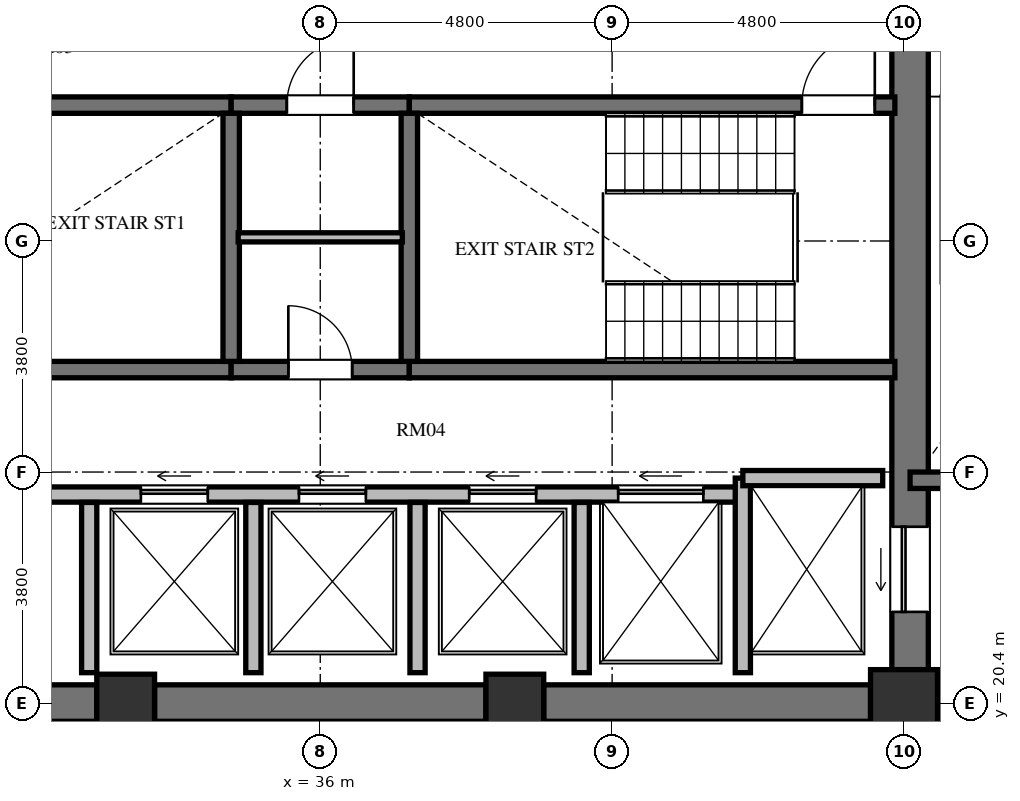
"""IFC4 building model, lengths in metres.
Left out: names, types, materials, properties, quantities, classifications, styles, units other than length and angle.
Written with IfcOpenShell. Run it as: python <this file> out.ifc"""

import sys

from ifc_helpers import new_model, si_unit, direction, frame, frame_2d, origin, origin_2d, place, context, subcontext, project, spatial, rectangle, extrude, element, fill, save


model = new_model("IFC4")
c1 = context("Model", 3, precision=1e-05, world=origin(), true_north=direction((0.0, 1.0)))
c2 = subcontext(c1, "Body", "Model", "MODEL_VIEW")
j1 = project(units=[si_unit("LENGTHUNIT", "METRE"), si_unit("PLANEANGLEUNIT", "RADIAN")], contexts=[c1])
p1 = place(None, origin())
s1 = spatial("IfcSite", under=j1, at=p1, CompositionType="ELEMENT")
p2 = place(p1, origin())
s2 = spatial("IfcBuilding", under=s1, at=p2, CompositionType="ELEMENT")
p3 = place(p2, frame((0.0, 0.0, 174.768)))
s3 = spatial("IfcBuildingStorey", under=s2, at=p3, CompositionType="ELEMENT", Elevation=174.768)
for number, where, z_axis, x_axis in (
    (1, (32.8, 20.4, 0.0), (0.0, 0.0, 1.0), (1.0, 0.0, 0.0)),
    (2, (39.2, 20.4, 0.0), (0.0, 0.0, 1.0), (1.0, 0.0, 0.0)),
):
    element("IfcColumn", number, at=place(p3, frame(where, z_axis=z_axis, x_axis=x_axis)), inside=s3, PredefinedType="COLUMN", context=c2, shape_type="SweptSolid", body=[
        extrude(rectangle(XDim=0.95, YDim=0.95, at=origin_2d()), origin(), (0.0, 0.0, 1.0), 3.648),
    ])
p4 = place(p3, frame((45.6, 20.4, 0.0), z_axis=(0.0, 0.0, 1.0), x_axis=(1.0, 0.0, 0.0)))
e3 = element("IfcColumn", 3, at=p4, inside=s3, PredefinedType="COLUMN", context=c2, shape_type="SweptSolid", body=[
    extrude(rectangle(XDim=1.1, YDim=1.1, at=origin_2d()), origin(), (0.0, 0.0, 1.0), 3.648),
])
p5 = place(p3, frame((45.7, 20.95, 0.0), z_axis=(0.0, 0.0, 1.0), x_axis=(0.0, 1.0, 0.0)))
e4 = element("IfcWall", 4, at=p5, inside=s3, PredefinedType="SHEAR", context=c2, shape_type="SweptSolid", body=[
    extrude(rectangle(XDim=14.1, YDim=0.6, at=frame_2d((7.05, 0.0))), origin(), (0.0, 0.0, 1.0), 3.648),
])
p6 = place(p5, frame((11.75, 0.0, 0.0)))
e5 = element("IfcOpeningElement", 5, at=p6, cuts=e4, PredefinedType="OPENING", context=c2, shape_type="SweptSolid", body=[
    extrude(rectangle(XDim=1.4, YDim=2.3, at=frame_2d((0.7, 1.15))), frame((0.0, 0.31, 0.0), z_axis=(0.0, -1.0, 0.0), x_axis=(1.0, 0.0, 0.0)), (0.0, 0.0, 1.0), 0.62),
])
p7 = place(p5, frame((0.95, 0.0, 0.0)))
e6 = element("IfcOpeningElement", 6, at=p7, cuts=e4, PredefinedType="OPENING", context=c2, shape_type="SweptSolid", body=[
    extrude(rectangle(XDim=1.4, YDim=2.3, at=frame_2d((0.7, 1.15))), frame((0.0, 0.31, 0.0), z_axis=(0.0, -1.0, 0.0), x_axis=(1.0, 0.0, 0.0)), (0.0, 0.0, 1.0), 0.62),
])
p8 = place(p3, frame((26.95, 20.4, 0.0), z_axis=(0.0, 0.0, 1.0), x_axis=(1.0, 0.0, 0.0)))
e7 = element("IfcWall", 7, at=p8, inside=s3, PredefinedType="SHEAR", context=c2, shape_type="SweptSolid", body=[
    extrude(rectangle(XDim=5.375, YDim=0.6, at=frame_2d((2.688, 0.0))), origin(), (0.0, 0.0, 1.0), 3.648),
])
p9 = place(p3, frame((33.275, 20.4, 0.0), z_axis=(0.0, 0.0, 1.0), x_axis=(1.0, 0.0, 0.0)))
e8 = element("IfcWall", 8, at=p9, inside=s3, PredefinedType="SHEAR", context=c2, shape_type="SweptSolid", body=[
    extrude(rectangle(XDim=5.45, YDim=0.6, at=frame_2d((2.725, 0.0))), origin(), (0.0, 0.0, 1.0), 3.648),
])
p10 = place(p3, frame((39.675, 20.4, 0.0), z_axis=(0.0, 0.0, 1.0), x_axis=(1.0, 0.0, 0.0)))
e9 = element("IfcWall", 9, at=p10, inside=s3, PredefinedType="SHEAR", context=c2, shape_type="SweptSolid", body=[
    extrude(rectangle(XDim=5.375, YDim=0.6, at=frame_2d((2.688, 0.0))), origin(), (0.0, 0.0, 1.0), 3.648),
])
p11 = place(p3, frame((26.55, 30.235, 0.0), z_axis=(0.0, 0.0, 1.0), x_axis=(1.0, 0.0, 0.0)))
e10 = element("IfcWall", 10, at=p11, inside=s3, PredefinedType="SHEAR", context=c2, shape_type="SweptSolid", body=[
    extrude(rectangle(XDim=7.985, YDim=0.27, at=frame_2d((3.992, 0.0))), origin(), (0.0, 0.0, 1.0), 3.648),
])
p12 = place(p3, frame((34.535, 30.235, 0.0), z_axis=(0.0, 0.0, 1.0), x_axis=(1.0, 0.0, 0.0)))
e11 = element("IfcWall", 11, at=p12, inside=s3, PredefinedType="SHEAR", context=c2, shape_type="SweptSolid", body=[
    extrude(rectangle(XDim=2.93, YDim=0.27, at=frame_2d((1.465, 0.0))), origin(), (0.0, 0.0, 1.0), 3.648),
])
p13 = place(p12, frame((0.915, 0.0, 0.0)))
e12 = element("IfcOpeningElement", 12, at=p13, cuts=e11, PredefinedType="OPENING", context=c2, shape_type="SweptSolid", body=[
    extrude(rectangle(XDim=1.1, YDim=2.15, at=frame_2d((0.55, 1.075))), frame((0.0, 0.145, 0.0), z_axis=(0.0, -1.0, 0.0), x_axis=(1.0, 0.0, 0.0)), (0.0, 0.0, 1.0), 0.29),
])
p14 = place(p3, frame((37.465, 30.235, 0.0), z_axis=(0.0, 0.0, 1.0), x_axis=(1.0, 0.0, 0.0)))
e13 = element("IfcWall", 13, at=p14, inside=s3, PredefinedType="SHEAR", context=c2, shape_type="SweptSolid", body=[
    extrude(rectangle(XDim=7.985, YDim=0.27, at=frame_2d((3.992, 0.0))), origin(), (0.0, 0.0, 1.0), 3.648),
])
p15 = place(p14, frame((6.455, 0.0, 0.0)))
e14 = element("IfcOpeningElement", 14, at=p15, cuts=e13, PredefinedType="OPENING", context=c2, shape_type="SweptSolid", body=[
    extrude(rectangle(XDim=1.2, YDim=2.15, at=frame_2d((0.6, 1.075))), frame((0.0, 0.145, 0.0), z_axis=(0.0, -1.0, 0.0), x_axis=(1.0, 0.0, 0.0)), (0.0, 0.0, 1.0), 0.29),
])
p16 = place(p3, frame((26.55, 25.885, 0.0), z_axis=(0.0, 0.0, 1.0), x_axis=(1.0, 0.0, 0.0)))
e15 = element("IfcWall", 15, at=p16, inside=s3, PredefinedType="SHEAR", context=c2, shape_type="SweptSolid", body=[
    extrude(rectangle(XDim=7.985, YDim=0.27, at=frame_2d((3.992, 0.0))), origin(), (0.0, 0.0, 1.0), 3.648),
])
p17 = place(p3, frame((34.535, 25.885, 0.0), z_axis=(0.0, 0.0, 1.0), x_axis=(1.0, 0.0, 0.0)))
e16 = element("IfcWall", 16, at=p17, inside=s3, PredefinedType="SHEAR", context=c2, shape_type="SweptSolid", body=[
    extrude(rectangle(XDim=2.93, YDim=0.27, at=frame_2d((1.465, 0.0))), origin(), (0.0, 0.0, 1.0), 3.648),
])
p18 = place(p17, frame((0.94, 0.0, 0.0)))
e17 = element("IfcOpeningElement", 17, at=p18, cuts=e16, PredefinedType="OPENING", context=c2, shape_type="SweptSolid", body=[
    extrude(rectangle(XDim=1.05, YDim=2.15, at=frame_2d((0.525, 1.075))), frame((0.0, 0.145, 0.0), z_axis=(0.0, -1.0, 0.0), x_axis=(1.0, 0.0, 0.0)), (0.0, 0.0, 1.0), 0.29),
])
p19 = place(p3, frame((37.465, 25.885, 0.0), z_axis=(0.0, 0.0, 1.0), x_axis=(1.0, 0.0, 0.0)))
e18 = element("IfcWall", 18, at=p19, inside=s3, PredefinedType="SHEAR", context=c2, shape_type="SweptSolid", body=[
    extrude(rectangle(XDim=7.985, YDim=0.27, at=frame_2d((3.992, 0.0))), origin(), (0.0, 0.0, 1.0), 3.648),
])
for number, where, z_axis, x_axis in (
    (19, (34.535, 26.02, 0.0), (0.0, 0.0, 1.0), (0.0, 1.0, 0.0)),
    (20, (37.465, 26.02, 0.0), (0.0, 0.0, 1.0), (0.0, 1.0, 0.0)),
):
    element("IfcWall", number, at=place(p3, frame(where, z_axis=z_axis, x_axis=x_axis)), inside=s3, PredefinedType="SHEAR", context=c2, shape_type="SweptSolid", body=[
        extrude(rectangle(XDim=4.08, YDim=0.27, at=frame_2d((2.04, 0.0))), origin(), (0.0, 0.0, 1.0), 3.648),
    ])
p20 = place(p3, frame((34.65, 28.06, 0.0), z_axis=(0.0, 0.0, 1.0), x_axis=(1.0, 0.0, 0.0)))
e21 = element("IfcWall", 21, at=p20, inside=s3, PredefinedType="PARTITIONING", context=c2, shape_type="SweptSolid", body=[
    extrude(rectangle(XDim=2.7, YDim=0.15, at=frame_2d((1.35, 0.0))), origin(), (0.0, 0.0, 1.0), 3.428),
])
p21 = place(p3, frame((26.75, 23.83, 0.0), z_axis=(0.0, 0.0, 1.0), x_axis=(1.0, 0.0, 0.0)))
e22 = element("IfcWall", 22, at=p21, inside=s3, PredefinedType="SOLIDWALL", context=c2, shape_type="SweptSolid", body=[
    extrude(rectangle(XDim=16.2, YDim=0.25, at=frame_2d((8.1, 0.0))), origin(), (0.0, 0.0, 1.0), 3.428),
])
p22 = place(p21, frame((2.225, 0.0, 0.0)))
e23 = element("IfcOpeningElement", 23, at=p22, cuts=e22, PredefinedType="OPENING", context=c2, shape_type="SweptSolid", body=[
    extrude(rectangle(XDim=1.05, YDim=2.15, at=frame_2d((0.525, 1.075))), frame((0.0, 0.135, 0.0), z_axis=(0.0, -1.0, 0.0), x_axis=(1.0, 0.0, 0.0)), (0.0, 0.0, 1.0), 0.27),
])
p23 = place(p21, frame((6.3, 0.0, 0.0)))
e24 = element("IfcOpeningElement", 24, at=p23, cuts=e22, PredefinedType="OPENING", context=c2, shape_type="SweptSolid", body=[
    extrude(rectangle(XDim=1.1, YDim=2.2, at=frame_2d((0.55, 1.1))), frame((0.0, 0.135, 0.0), z_axis=(0.0, -1.0, 0.0), x_axis=(1.0, 0.0, 0.0)), (0.0, 0.0, 1.0), 0.27),
])
p24 = place(p21, frame((8.9, 0.0, 0.0)))
e25 = element("IfcOpeningElement", 25, at=p24, cuts=e22, PredefinedType="OPENING", context=c2, shape_type="SweptSolid", body=[
    extrude(rectangle(XDim=1.1, YDim=2.2, at=frame_2d((0.55, 1.1))), frame((0.0, 0.135, 0.0), z_axis=(0.0, -1.0, 0.0), x_axis=(1.0, 0.0, 0.0)), (0.0, 0.0, 1.0), 0.27),
])
p25 = place(p21, frame((11.7, 0.0, 0.0)))
e26 = element("IfcOpeningElement", 26, at=p25, cuts=e22, PredefinedType="OPENING", context=c2, shape_type="SweptSolid", body=[
    extrude(rectangle(XDim=1.1, YDim=2.2, at=frame_2d((0.55, 1.1))), frame((0.0, 0.135, 0.0), z_axis=(0.0, -1.0, 0.0), x_axis=(1.0, 0.0, 0.0)), (0.0, 0.0, 1.0), 0.27),
])
p26 = place(p21, frame((14.15, 0.0, 0.0)))
e27 = element("IfcOpeningElement", 27, at=p26, cuts=e22, PredefinedType="OPENING", context=c2, shape_type="SweptSolid", body=[
    extrude(rectangle(XDim=1.4, YDim=2.3, at=frame_2d((0.7, 1.15))), frame((0.0, 0.135, 0.0), z_axis=(0.0, -1.0, 0.0), x_axis=(1.0, 0.0, 0.0)), (0.0, 0.0, 1.0), 0.27),
])
p27 = place(p3, frame((42.95, 20.9, 0.0), z_axis=(0.0, 0.0, 1.0), x_axis=(0.0, 1.0, 0.0)))
e28 = element("IfcWall", 28, at=p27, inside=s3, PredefinedType="SOLIDWALL", context=c2, shape_type="SweptSolid", body=[
    extrude(rectangle(XDim=3.2, YDim=0.25, at=frame_2d((1.6, 0.0))), origin(), (0.0, 0.0, 1.0), 3.428),
])
p28 = place(p3, frame((42.95, 24.1, 0.0), z_axis=(0.0, 0.0, 1.0), x_axis=(1.0, 0.0, 0.0)))
e29 = element("IfcWall", 29, at=p28, inside=s3, PredefinedType="SOLIDWALL", context=c2, shape_type="SweptSolid", body=[
    extrude(rectangle(XDim=2.3, YDim=0.25, at=frame_2d((1.15, 0.0))), origin(), (0.0, 0.0, 1.0), 3.428),
])
for number, where, z_axis, x_axis in (
    (30, (32.2, 20.9, 0.0), (0.0, 0.0, 1.0), (0.0, 1.0, 0.0)),
    (31, (34.9, 20.9, 0.0), (0.0, 0.0, 1.0), (0.0, 1.0, 0.0)),
    (32, (37.6, 20.9, 0.0), (0.0, 0.0, 1.0), (0.0, 1.0, 0.0)),
    (33, (40.3, 20.9, 0.0), (0.0, 0.0, 1.0), (0.0, 1.0, 0.0)),
):
    element("IfcWall", number, at=place(p3, frame(where, z_axis=z_axis, x_axis=x_axis)), inside=s3, PredefinedType="SOLIDWALL", context=c2, shape_type="SweptSolid", body=[
        extrude(rectangle(XDim=2.8, YDim=0.25, at=frame_2d((1.4, 0.0))), origin(), (0.0, 0.0, 1.0), 3.428),
    ])
p29 = place(p3, frame((45.7, 24.065, 0.0), z_axis=(0.0, 0.0, 1.0), x_axis=(1.0, 0.0, 0.0)))
e34 = element("IfcWall", 34, at=p29, inside=s3, PredefinedType="SHEAR", context=c2, shape_type="SweptSolid", body=[
    extrude(rectangle(XDim=4.715, YDim=0.27, at=frame_2d((2.357, 0.0))), origin(), (0.0, 0.0, 1.0), 3.648),
])
p30 = place(p3, frame((45.7, 20.02, 0.0), z_axis=(0.0, 0.0, 1.0), x_axis=(1.0, 0.0, 0.0)))
e35 = element("IfcWall", 35, at=p30, inside=s3, PredefinedType="SOLIDWALL", context=c2, shape_type="SweptSolid", body=[
    extrude(rectangle(XDim=4.715, YDim=0.25, at=frame_2d((2.357, 0.0))), origin(), (0.0, 0.0, 1.0), 3.428),
])
p31 = place(p15, origin())
e36 = element("IfcDoor", 36, at=p31, inside=s3, OperationType="SINGLE_SWING_RIGHT", PredefinedType="DOOR", context=c2, shape_type="SweptSolid", body=[
    extrude(rectangle(XDim=1.2, YDim=2.15, at=frame_2d((0.6, 1.075))), frame((0.0, 0.025, 0.0), z_axis=(0.0, -1.0, 0.0), x_axis=(1.0, 0.0, 0.0)), (0.0, 0.0, 1.0), 0.05),
])
fill(e14, e36)
p32 = place(p18, origin())
e37 = element("IfcDoor", 37, at=p32, inside=s3, OperationType="SINGLE_SWING_LEFT", PredefinedType="DOOR", context=c2, shape_type="SweptSolid", body=[
    extrude(rectangle(XDim=1.05, YDim=2.15, at=frame_2d((0.525, 1.075))), frame((0.0, 0.025, 0.0), z_axis=(0.0, -1.0, 0.0), x_axis=(1.0, 0.0, 0.0)), (0.0, 0.0, 1.0), 0.05),
])
fill(e17, e37)
p33 = place(p13, origin())
e38 = element("IfcDoor", 38, at=p33, inside=s3, OperationType="SINGLE_SWING_RIGHT", PredefinedType="DOOR", context=c2, shape_type="SweptSolid", body=[
    extrude(rectangle(XDim=1.1, YDim=2.15, at=frame_2d((0.55, 1.075))), frame((0.0, 0.025, 0.0), z_axis=(0.0, -1.0, 0.0), x_axis=(1.0, 0.0, 0.0)), (0.0, 0.0, 1.0), 0.05),
])
fill(e12, e38)
p34 = place(p23, origin())
e39 = element("IfcDoor", 39, at=p34, inside=s3, OperationType="SLIDING_TO_LEFT", PredefinedType="DOOR", context=c2, shape_type="SweptSolid", body=[
    extrude(rectangle(XDim=1.1, YDim=2.2, at=frame_2d((0.55, 1.1))), frame((0.0, 0.025, 0.0), z_axis=(0.0, -1.0, 0.0), x_axis=(1.0, 0.0, 0.0)), (0.0, 0.0, 1.0), 0.05),
])
fill(e24, e39)
p35 = place(p24, origin())
e40 = element("IfcDoor", 40, at=p35, inside=s3, OperationType="SLIDING_TO_LEFT", PredefinedType="DOOR", context=c2, shape_type="SweptSolid", body=[
    extrude(rectangle(XDim=1.1, YDim=2.2, at=frame_2d((0.55, 1.1))), frame((0.0, 0.025, 0.0), z_axis=(0.0, -1.0, 0.0), x_axis=(1.0, 0.0, 0.0)), (0.0, 0.0, 1.0), 0.05),
])
fill(e25, e40)
p36 = place(p25, origin())
e41 = element("IfcDoor", 41, at=p36, inside=s3, OperationType="SLIDING_TO_LEFT", PredefinedType="DOOR", context=c2, shape_type="SweptSolid", body=[
    extrude(rectangle(XDim=1.1, YDim=2.2, at=frame_2d((0.55, 1.1))), frame((0.0, 0.025, 0.0), z_axis=(0.0, -1.0, 0.0), x_axis=(1.0, 0.0, 0.0)), (0.0, 0.0, 1.0), 0.05),
])
fill(e26, e41)
p37 = place(p7, origin())
e42 = element("IfcDoor", 42, at=p37, inside=s3, OperationType="SLIDING_TO_LEFT", PredefinedType="DOOR", context=c2, shape_type="SweptSolid", body=[
    extrude(rectangle(XDim=1.4, YDim=2.3, at=frame_2d((0.7, 1.15))), frame((0.0, 0.025, 0.0), z_axis=(0.0, -1.0, 0.0), x_axis=(1.0, 0.0, 0.0)), (0.0, 0.0, 1.0), 0.05),
])
fill(e6, e42)
p38 = place(p26, origin())
e43 = element("IfcDoor", 43, at=p38, inside=s3, OperationType="SLIDING_TO_LEFT", PredefinedType="DOOR", context=c2, shape_type="SweptSolid", body=[
    extrude(rectangle(XDim=1.4, YDim=2.3, at=frame_2d((0.7, 1.15))), frame((0.0, 0.025, 0.0), z_axis=(0.0, -1.0, 0.0), x_axis=(1.0, 0.0, 0.0)), (0.0, 0.0, 1.0), 0.05),
])
fill(e27, e43)
save(model, sys.argv[1])
